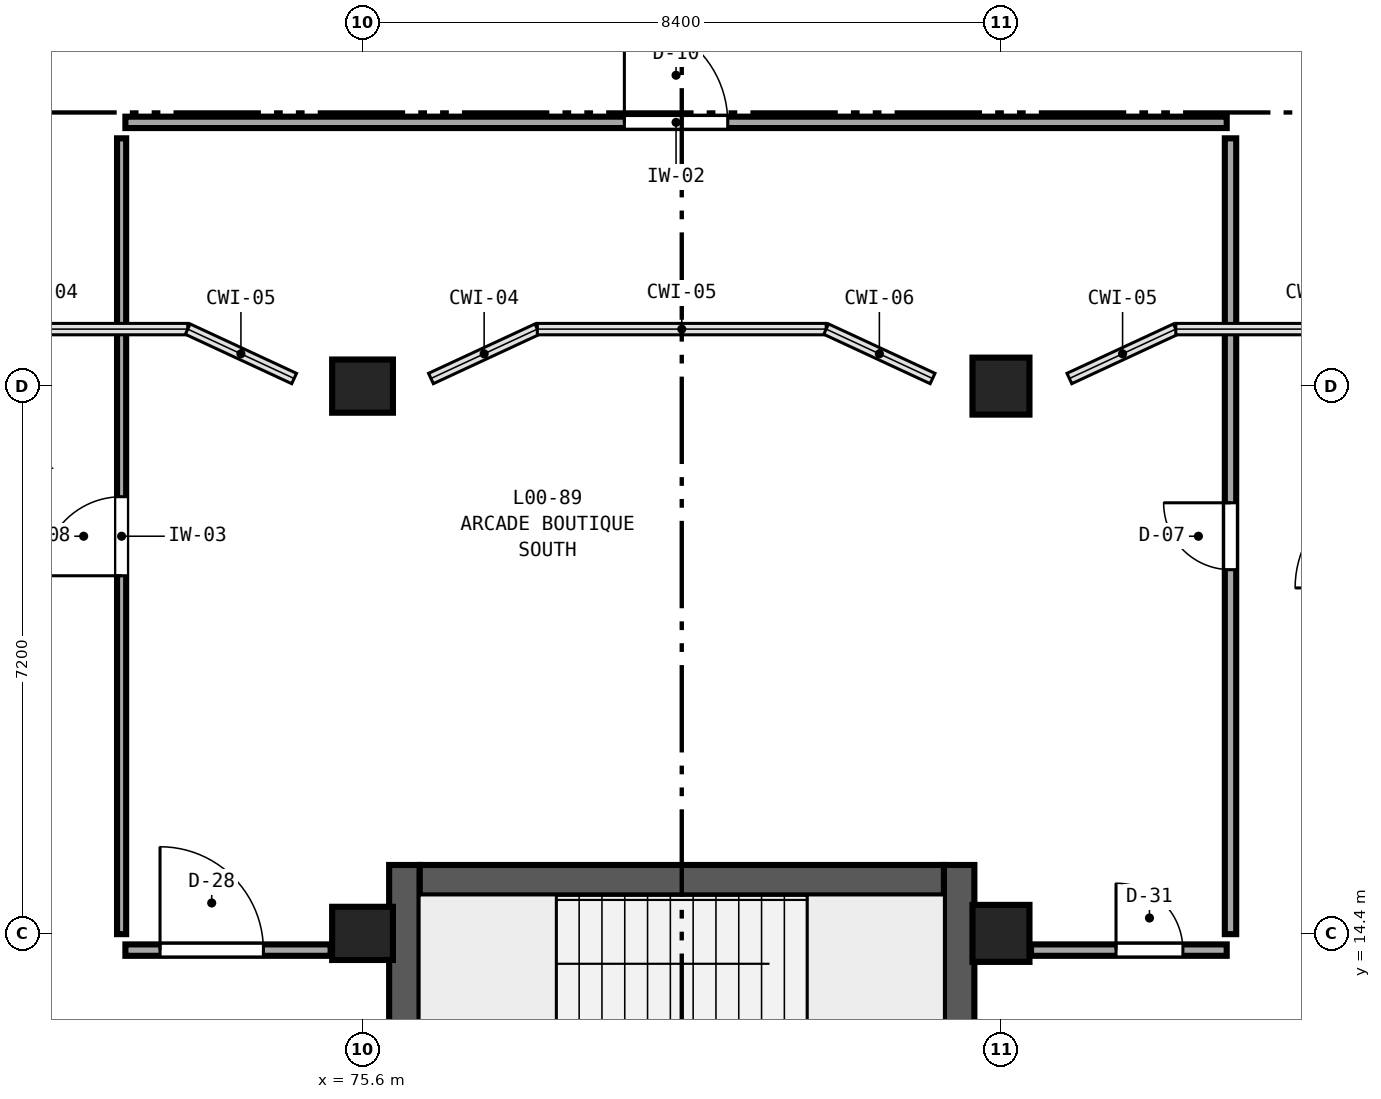
"""IFC4 building model, lengths in metres.
Left out: names, types, materials, properties, quantities, classifications, styles, units other than length and angle.
Written with IfcOpenShell. Run it as: python <this file> out.ifc"""

import sys

from ifc_helpers import new_model, si_unit, direction, frame, frame_2d, origin, origin_2d, place, context, subcontext, project, spatial, rectangle, extrude, element, fill, save


model = new_model("IFC4")
c1 = context("Model", 3, precision=1e-05, world=origin(), true_north=direction((0.0, 1.0)))
c2 = subcontext(c1, "Body", "Model", "MODEL_VIEW")
j1 = project(units=[si_unit("LENGTHUNIT", "METRE"), si_unit("PLANEANGLEUNIT", "RADIAN")], contexts=[c1])
p1 = place(None, origin())
s1 = spatial("IfcSite", under=j1, at=p1, CompositionType="ELEMENT")
p2 = place(p1, origin())
s2 = spatial("IfcBuilding", under=s1, at=p2, CompositionType="ELEMENT")
p3 = place(p2, origin())
s3 = spatial("IfcBuildingStorey", under=s2, at=p3, CompositionType="ELEMENT", Elevation=0.0)
for number, where, z_axis, x_axis in (
    (1, (75.6, 14.4, 0.0), (0.0, 0.0, 1.0), (1.0, 0.0, 0.0)),
    (2, (75.6, 21.6, 0.0), (0.0, 0.0, 1.0), (1.0, 0.0, 0.0)),
):
    element("IfcColumn", number, at=place(p3, frame(where, z_axis=z_axis, x_axis=x_axis)), inside=s3, PredefinedType="COLUMN", context=c2, shape_type="SweptSolid", body=[
        extrude(rectangle(XDim=0.8, YDim=0.7, at=origin_2d()), origin(), (0.0, 0.0, 1.0), 5.4),
    ])
for number, where, z_axis, x_axis in (
    (3, (84.0, 14.4, 0.0), (0.0, 0.0, 1.0), (1.0, 0.0, 0.0)),
    (4, (84.0, 21.6, 0.0), (0.0, 0.0, 1.0), (1.0, 0.0, 0.0)),
):
    element("IfcColumn", number, at=place(p3, frame(where, z_axis=z_axis, x_axis=x_axis)), inside=s3, PredefinedType="COLUMN", context=c2, shape_type="SweptSolid", body=[
        extrude(rectangle(XDim=0.75, YDim=0.75, at=origin_2d()), origin(), (0.0, 0.0, 1.0), 5.4),
    ])
p4 = place(p3, frame((76.35, 15.1, 0.0), z_axis=(0.0, 0.0, 1.0), x_axis=(1.0, 0.0, 0.0)))
e5 = element("IfcWall", 5, at=p4, inside=s3, PredefinedType="SHEAR", context=c2, shape_type="SweptSolid", body=[
    extrude(rectangle(XDim=6.9, YDim=0.4, at=frame_2d((3.45, 0.0))), origin(), (0.0, 0.0, 1.0), 5.4),
])
for number, where, z_axis, x_axis in (
    (6, (76.15, 15.3, 0.0), (0.0, 0.0, 1.0), (0.0, -1.0, 0.0)),
    (7, (83.45, 7.25, 0.0), (0.0, 0.0, 1.0), (0.0, 1.0, 0.0)),
):
    element("IfcWall", number, at=place(p3, frame(where, z_axis=z_axis, x_axis=x_axis)), inside=s3, PredefinedType="SHEAR", context=c2, shape_type="SweptSolid", body=[
        extrude(rectangle(XDim=8.05, YDim=0.4, at=frame_2d((4.025, 0.0))), origin(), (0.0, 0.0, 1.0), 5.4),
    ])
p5 = place(p3, frame((72.48, 25.07, 0.0), z_axis=(0.0, 0.0, 1.0), x_axis=(1.0, 0.0, 0.0)))
e8 = element("IfcWall", 8, at=p5, inside=s3, PredefinedType="PARTITIONING", context=c2, shape_type="SweptSolid", body=[
    extrude(rectangle(XDim=14.49, YDim=0.15, at=frame_2d((7.245, 0.0))), origin(), (0.0, 0.0, 1.0), 5.08),
])
p6 = place(p5, frame((6.565, 0.0, 0.0)))
e9 = element("IfcOpeningElement", 9, at=p6, cuts=e8, PredefinedType="OPENING", context=c2, shape_type="SweptSolid", body=[
    extrude(rectangle(XDim=1.36, YDim=2.13, at=frame_2d((0.68, 1.065))), frame((0.0, 0.095, 0.0), z_axis=(0.0, -1.0, 0.0), x_axis=(1.0, 0.0, 0.0)), (0.0, 0.0, 1.0), 0.19),
])
p7 = place(p3, frame((87.02, 14.39, 0.0), z_axis=(0.0, 0.0, 1.0), x_axis=(0.0, 1.0, 0.0)))
e10 = element("IfcWall", 10, at=p7, inside=s3, PredefinedType="PARTITIONING", context=c2, shape_type="SweptSolid", body=[
    extrude(rectangle(XDim=10.47, YDim=0.15, at=frame_2d((5.235, 0.0))), origin(), (0.0, 0.0, 1.0), 5.08),
])
p8 = place(p7, frame((4.795, 0.0, 0.0)))
e11 = element("IfcOpeningElement", 11, at=p8, cuts=e10, PredefinedType="OPENING", context=c2, shape_type="SweptSolid", body=[
    extrude(rectangle(XDim=0.88, YDim=2.13, at=frame_2d((0.44, 1.065))), frame((0.0, 0.095, 0.0), z_axis=(0.0, -1.0, 0.0), x_axis=(1.0, 0.0, 0.0)), (0.0, 0.0, 1.0), 0.19),
])
p9 = place(p3, frame((72.43, 14.39, 0.0), z_axis=(0.0, 0.0, 1.0), x_axis=(0.0, 1.0, 0.0)))
e12 = element("IfcWall", 12, at=p9, inside=s3, PredefinedType="PARTITIONING", context=c2, shape_type="SweptSolid", body=[
    extrude(rectangle(XDim=10.47, YDim=0.12, at=frame_2d((5.235, 0.0))), origin(), (0.0, 0.0, 1.0), 5.08),
])
p10 = place(p9, frame((4.715, 0.0, 0.0)))
e13 = element("IfcOpeningElement", 13, at=p10, cuts=e12, PredefinedType="OPENING", context=c2, shape_type="SweptSolid", body=[
    extrude(rectangle(XDim=1.04, YDim=2.13, at=frame_2d((0.52, 1.065))), frame((0.0, 0.08, 0.0), z_axis=(0.0, -1.0, 0.0), x_axis=(1.0, 0.0, 0.0)), (0.0, 0.0, 1.0), 0.16),
])
p11 = place(p3, frame((72.48, 14.18, 0.0), z_axis=(0.0, 0.0, 1.0), x_axis=(1.0, 0.0, 0.0)))
e14 = element("IfcWall", 14, at=p11, inside=s3, PredefinedType="PARTITIONING", context=c2, shape_type="SweptSolid", body=[
    extrude(rectangle(XDim=2.7, YDim=0.15, at=frame_2d((1.35, 0.0))), origin(), (0.0, 0.0, 1.0), 4.58),
])
p12 = place(p11, frame((0.456, 0.0, 0.0)))
e15 = element("IfcOpeningElement", 15, at=p12, cuts=e14, PredefinedType="OPENING", context=c2, shape_type="SweptSolid", body=[
    extrude(rectangle(XDim=1.36, YDim=2.37, at=frame_2d((0.68, 1.185))), frame((0.0, 0.095, 0.0), z_axis=(0.0, -1.0, 0.0), x_axis=(1.0, 0.0, 0.0)), (0.0, 0.0, 1.0), 0.19),
])
p13 = place(p3, frame((84.395, 14.18, 0.0), z_axis=(0.0, 0.0, 1.0), x_axis=(1.0, 0.0, 0.0)))
e16 = element("IfcWall", 16, at=p13, inside=s3, PredefinedType="PARTITIONING", context=c2, shape_type="SweptSolid", body=[
    extrude(rectangle(XDim=2.575, YDim=0.15, at=frame_2d((1.288, 0.0))), origin(), (0.0, 0.0, 1.0), 4.58),
])
p14 = place(p13, frame((1.119, 0.0, 0.0)))
e17 = element("IfcOpeningElement", 17, at=p14, cuts=e16, PredefinedType="OPENING", context=c2, shape_type="SweptSolid", body=[
    extrude(rectangle(XDim=0.88, YDim=2.45, at=frame_2d((0.44, 1.225))), frame((0.0, 0.095, 0.0), z_axis=(0.0, -1.0, 0.0), x_axis=(1.0, 0.0, 0.0)), (0.0, 0.0, 1.0), 0.19),
])
p15 = place(p6, frame((1.36, 0.0, 0.0), z_axis=(0.0, 0.0, 1.0), x_axis=(-1.0, 0.0, 0.0)))
e18 = element("IfcDoor", 18, at=p15, inside=s3, OperationType="SINGLE_SWING_LEFT", PredefinedType="DOOR", context=c2, shape_type="SweptSolid", body=[
    extrude(rectangle(XDim=1.36, YDim=2.13, at=frame_2d((0.68, 1.065))), frame((0.0, 0.025, 0.0), z_axis=(0.0, -1.0, 0.0), x_axis=(1.0, 0.0, 0.0)), (0.0, 0.0, 1.0), 0.05),
])
fill(e9, e18)
p16 = place(p8, origin())
e19 = element("IfcDoor", 19, at=p16, inside=s3, OperationType="SINGLE_SWING_RIGHT", PredefinedType="DOOR", context=c2, shape_type="SweptSolid", body=[
    extrude(rectangle(XDim=0.88, YDim=2.13, at=frame_2d((0.44, 1.065))), frame((0.0, 0.025, 0.0), z_axis=(0.0, -1.0, 0.0), x_axis=(1.0, 0.0, 0.0)), (0.0, 0.0, 1.0), 0.05),
])
fill(e11, e19)
p17 = place(p10, frame((1.04, 0.0, 0.0), z_axis=(0.0, 0.0, 1.0), x_axis=(-1.0, 0.0, 0.0)))
e20 = element("IfcDoor", 20, at=p17, inside=s3, OperationType="SINGLE_SWING_LEFT", PredefinedType="DOOR", context=c2, shape_type="SweptSolid", body=[
    extrude(rectangle(XDim=1.04, YDim=2.13, at=frame_2d((0.52, 1.065))), frame((0.0, 0.025, 0.0), z_axis=(0.0, -1.0, 0.0), x_axis=(1.0, 0.0, 0.0)), (0.0, 0.0, 1.0), 0.05),
])
fill(e13, e20)
p18 = place(p12, origin())
e21 = element("IfcDoor", 21, at=p18, inside=s3, OperationType="SINGLE_SWING_LEFT", PredefinedType="DOOR", context=c2, shape_type="SweptSolid", body=[
    extrude(rectangle(XDim=1.36, YDim=2.37, at=frame_2d((0.68, 1.185))), frame((0.0, 0.025, 0.0), z_axis=(0.0, -1.0, 0.0), x_axis=(1.0, 0.0, 0.0)), (0.0, 0.0, 1.0), 0.05),
])
fill(e15, e21)
p19 = place(p14, origin())
e22 = element("IfcDoor", 22, at=p19, inside=s3, OperationType="SINGLE_SWING_LEFT", PredefinedType="DOOR", context=c2, shape_type="SweptSolid", body=[
    extrude(rectangle(XDim=0.88, YDim=2.45, at=frame_2d((0.44, 1.225))), frame((0.0, 0.025, 0.0), z_axis=(0.0, -1.0, 0.0), x_axis=(1.0, 0.0, 0.0)), (0.0, 0.0, 1.0), 0.05),
])
fill(e17, e22)
save(model, sys.argv[1])
